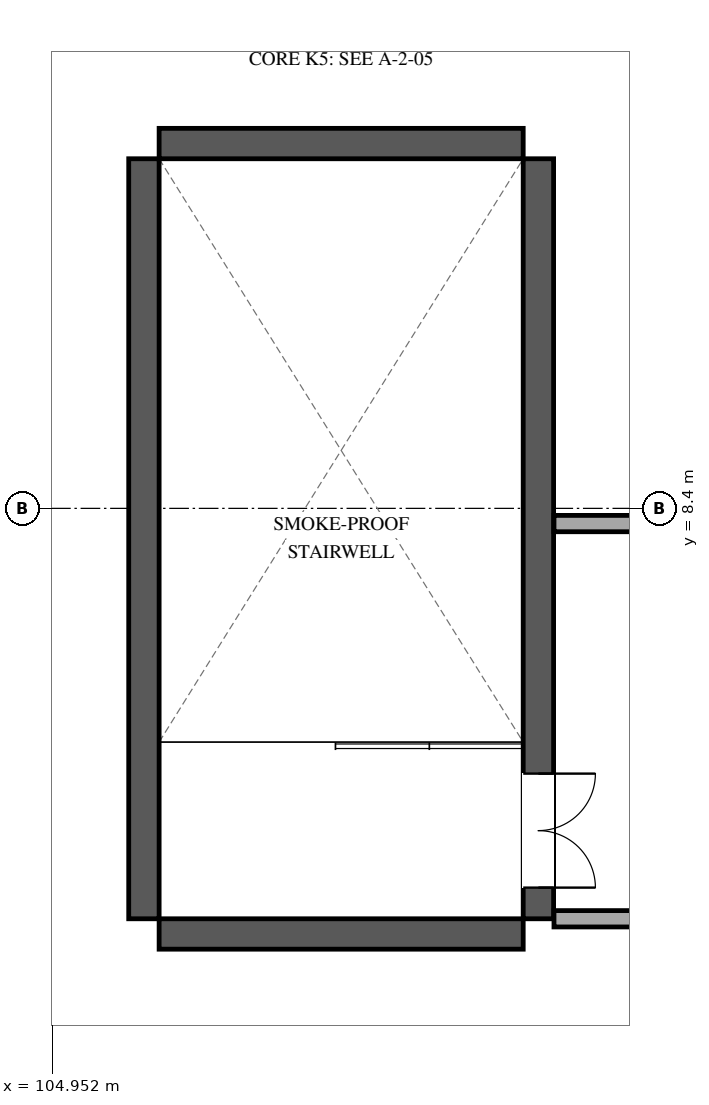
"""IFC4 building model, lengths in metres.
Left out: names, types, materials, properties, quantities, classifications, styles, units other than length and angle.
Written with IfcOpenShell. Run it as: python <this file> out.ifc"""

import sys

from ifc_helpers import new_model, si_unit, direction, frame, frame_2d, origin, place, context, subcontext, project, spatial, rectangle, extrude, element, fill, save


model = new_model("IFC4")
c1 = context("Model", 3, precision=1e-05, world=origin(), true_north=direction((0.0, 1.0)))
c2 = subcontext(c1, "Body", "Model", "MODEL_VIEW")
j1 = project(units=[si_unit("LENGTHUNIT", "METRE"), si_unit("PLANEANGLEUNIT", "RADIAN")], contexts=[c1])
p1 = place(None, origin())
s1 = spatial("IfcSite", under=j1, at=p1, CompositionType="ELEMENT")
p2 = place(p1, origin())
s2 = spatial("IfcBuilding", under=s1, at=p2, CompositionType="ELEMENT")
p3 = place(p2, frame((0.0, 0.0, 11.4)))
s3 = spatial("IfcBuildingStorey", under=s2, at=p3, CompositionType="ELEMENT", Elevation=11.4)
p4 = place(p3, frame((106.155, 3.0, 0.0), z_axis=(0.0, 0.0, 1.0), x_axis=(0.0, 1.0, 0.0)))
e1 = element("IfcWall", 1, at=p4, inside=s3, PredefinedType="SHEAR", context=c2, shape_type="SweptSolid", body=[
    extrude(rectangle(XDim=10.0, YDim=0.4, at=frame_2d((5.0, 0.0))), origin(), (0.0, 0.0, 1.0), 5.1),
])
p5 = place(p3, frame((111.345, 13.0, 0.0), z_axis=(0.0, 0.0, 1.0), x_axis=(0.0, -1.0, 0.0)))
e2 = element("IfcWall", 2, at=p5, inside=s3, PredefinedType="SHEAR", context=c2, shape_type="SweptSolid", body=[
    extrude(rectangle(XDim=10.0, YDim=0.4, at=frame_2d((5.0, 0.0))), origin(), (0.0, 0.0, 1.0), 5.1),
])
p6 = place(p5, frame((8.09, 0.0, 0.0)))
e3 = element("IfcOpeningElement", 3, at=p6, cuts=e2, PredefinedType="OPENING", context=c2, shape_type="SweptSolid", body=[
    extrude(rectangle(XDim=1.5, YDim=2.2, at=frame_2d((0.75, 1.1))), frame((0.0, 0.21, 0.0), z_axis=(0.0, -1.0, 0.0), x_axis=(1.0, 0.0, 0.0)), (0.0, 0.0, 1.0), 0.42),
])
for number, where, z_axis, x_axis in (
    (4, (111.145, 2.8, 0.0), (0.0, 0.0, 1.0), (-1.0, 0.0, 0.0)),
    (5, (106.355, 13.2, 0.0), (0.0, 0.0, 1.0), (1.0, 0.0, 0.0)),
):
    element("IfcWall", number, at=place(p3, frame(where, z_axis=z_axis, x_axis=x_axis)), inside=s3, PredefinedType="SHEAR", context=c2, shape_type="SweptSolid", body=[
        extrude(rectangle(XDim=4.79, YDim=0.4, at=frame_2d((2.395, 0.0))), origin(), (0.0, 0.0, 1.0), 5.1),
    ])
p7 = place(p3, frame((111.55, 8.2, 0.0), z_axis=(0.0, 0.0, 1.0), x_axis=(1.0, 0.0, 0.0)))
e6 = element("IfcWall", 6, at=p7, inside=s3, PredefinedType="PARTITIONING", context=c2, shape_type="SweptSolid", body=[
    extrude(rectangle(XDim=1.09, YDim=0.215, at=frame_2d((0.545, 0.0))), origin(), (0.0, 0.0, 1.0), 4.76),
])
p8 = place(p3, frame((117.6, 3.0, 0.0), z_axis=(0.0, 0.0, 1.0), x_axis=(-1.0, 0.0, 0.0)))
e7 = element("IfcWall", 7, at=p8, inside=s3, PredefinedType="PARTITIONING", context=c2, shape_type="SweptSolid", body=[
    extrude(rectangle(XDim=6.05, YDim=0.215, at=frame_2d((3.025, 0.0))), origin(), (0.0, 0.0, 1.0), 4.06),
])
p9 = place(p6, origin())
e8 = element("IfcDoor", 8, at=p9, inside=s3, OperationType="DOUBLE_DOOR_SINGLE_SWING", PredefinedType="DOOR", context=c2, shape_type="SweptSolid", body=[
    extrude(rectangle(XDim=1.5, YDim=2.2, at=frame_2d((0.75, 1.1))), frame((0.0, 0.025, 0.0), z_axis=(0.0, -1.0, 0.0), x_axis=(1.0, 0.0, 0.0)), (0.0, 0.0, 1.0), 0.05),
])
fill(e3, e8)
save(model, sys.argv[1])
